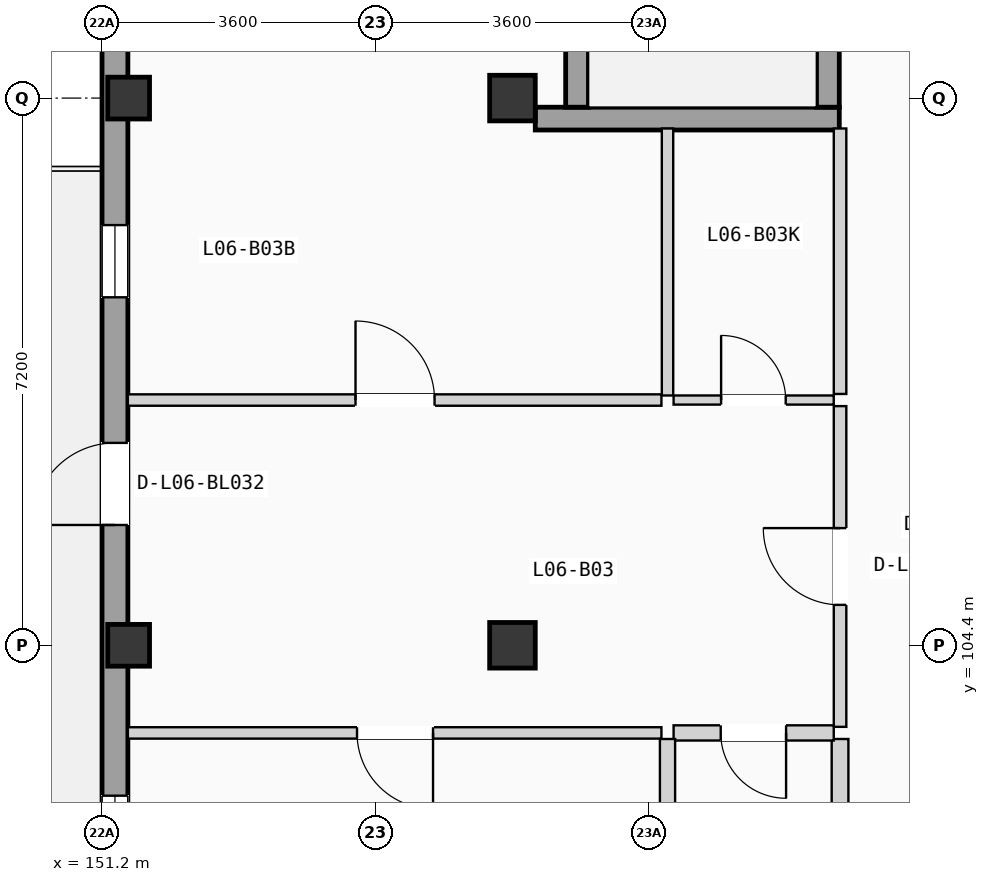
"""IFC4 building model, lengths in metres.
Left out: names, types, materials, properties, quantities, classifications, styles, units other than length and angle.
Written with IfcOpenShell. Run it as: python <this file> out.ifc"""

import sys

from ifc_helpers import new_model, si_unit, direction, frame, frame_2d, origin, origin_2d, place, context, subcontext, project, spatial, rectangle, extrude, element, fill, save


model = new_model("IFC4")
c1 = context("Model", 3, precision=1e-05, world=origin(), true_north=direction((0.0, 1.0)))
c2 = subcontext(c1, "Body", "Model", "MODEL_VIEW")
j1 = project(units=[si_unit("LENGTHUNIT", "METRE"), si_unit("PLANEANGLEUNIT", "RADIAN")], contexts=[c1])
p1 = place(None, origin())
s1 = spatial("IfcSite", under=j1, at=p1, CompositionType="ELEMENT")
p2 = place(p1, origin())
s2 = spatial("IfcBuilding", under=s1, at=p2, CompositionType="ELEMENT")
p3 = place(p2, frame((0.0, 0.0, 21.525)))
s3 = spatial("IfcBuildingStorey", under=s2, at=p3, CompositionType="ELEMENT", Elevation=21.525)
for number, where, z_axis, x_axis in (
    (1, (151.55, 104.4, 0.0), (0.0, 0.0, 1.0), (1.0, 0.0, 0.0)),
    (2, (151.55, 111.6, 0.0), (0.0, 0.0, 1.0), (1.0, 0.0, 0.0)),
):
    element("IfcColumn", number, at=place(p3, frame(where, z_axis=z_axis, x_axis=x_axis)), inside=s3, PredefinedType="COLUMN", context=c2, shape_type="SweptSolid", body=[
        extrude(rectangle(XDim=0.55, YDim=0.55, at=origin_2d()), origin(), (0.0, 0.0, 1.0), 3.15),
    ])
for number, where, z_axis, x_axis in (
    (3, (156.6, 104.4, 0.0), (0.0, 0.0, 1.0), (1.0, 0.0, 0.0)),
    (4, (156.6, 111.6, 0.0), (0.0, 0.0, 1.0), (1.0, 0.0, 0.0)),
):
    element("IfcColumn", number, at=place(p3, frame(where, z_axis=z_axis, x_axis=x_axis)), inside=s3, PredefinedType="COLUMN", context=c2, shape_type="SweptSolid", body=[
        extrude(rectangle(XDim=0.6, YDim=0.6, at=origin_2d()), origin(), (0.0, 0.0, 1.0), 3.15),
    ])
p4 = place(p3, frame((151.37, 68.74, 0.0), z_axis=(0.0, 0.0, 1.0), x_axis=(0.0, 1.0, 0.0)))
e5 = element("IfcWall", 5, at=p4, inside=s3, PredefinedType="SOLIDWALL", context=c2, shape_type="SweptSolid", body=[
    extrude(rectangle(XDim=49.72, YDim=0.34, at=frame_2d((24.86, 0.0))), origin(), (0.0, 0.0, 1.0), 2.89),
])
p5 = place(p4, frame((11.462, 0.0, 0.0)))
e6 = element("IfcOpeningElement", 6, at=p5, cuts=e5, PredefinedType="OPENING", context=c2, shape_type="SweptSolid", body=[
    extrude(rectangle(XDim=0.95, YDim=2.15, at=frame_2d((0.475, 1.075))), frame((0.0, 0.18, 0.0), z_axis=(0.0, -1.0, 0.0), x_axis=(1.0, 0.0, 0.0)), (0.0, 0.0, 1.0), 0.36),
])
p6 = place(p4, frame((8.082, 0.0, 0.555)))
e7 = element("IfcOpeningElement", 7, at=p6, cuts=e5, PredefinedType="OPENING", context=c2, shape_type="SweptSolid", body=[
    extrude(rectangle(XDim=1.85, YDim=1.65, at=frame_2d((0.925, 0.825))), frame((0.0, 0.18, 0.0), z_axis=(0.0, -1.0, 0.0), x_axis=(1.0, 0.0, 0.0)), (0.0, 0.0, 1.0), 0.36),
])
p7 = place(p4, frame((16.565, 0.0, 0.85)))
e8 = element("IfcOpeningElement", 8, at=p7, cuts=e5, PredefinedType="OPENING", context=c2, shape_type="SweptSolid", body=[
    extrude(rectangle(XDim=0.95, YDim=1.2, at=frame_2d((0.475, 0.6))), frame((0.0, 0.18, 0.0), z_axis=(0.0, -1.0, 0.0), x_axis=(1.0, 0.0, 0.0)), (0.0, 0.0, 1.0), 0.36),
])
p8 = place(p4, frame((23.86, 0.0, 0.9)))
e9 = element("IfcOpeningElement", 9, at=p8, cuts=e5, PredefinedType="OPENING", context=c2, shape_type="SweptSolid", body=[
    extrude(rectangle(XDim=2.0, YDim=1.2, at=frame_2d((1.0, 0.6))), frame((0.0, 0.18, 0.0), z_axis=(0.0, -1.0, 0.0), x_axis=(1.0, 0.0, 0.0)), (0.0, 0.0, 1.0), 0.36),
])
p9 = place(p4, frame((19.503, 0.0, 0.85)))
e10 = element("IfcOpeningElement", 10, at=p9, cuts=e5, PredefinedType="OPENING", context=c2, shape_type="SweptSolid", body=[
    extrude(rectangle(XDim=0.95, YDim=1.2, at=frame_2d((0.475, 0.6))), frame((0.0, 0.18, 0.0), z_axis=(0.0, -1.0, 0.0), x_axis=(1.0, 0.0, 0.0)), (0.0, 0.0, 1.0), 0.36),
])
p10 = place(p4, frame((29.267, 0.0, 0.85)))
e11 = element("IfcOpeningElement", 11, at=p10, cuts=e5, PredefinedType="OPENING", context=c2, shape_type="SweptSolid", body=[
    extrude(rectangle(XDim=0.95, YDim=1.2, at=frame_2d((0.475, 0.6))), frame((0.0, 0.18, 0.0), z_axis=(0.0, -1.0, 0.0), x_axis=(1.0, 0.0, 0.0)), (0.0, 0.0, 1.0), 0.36),
])
p11 = place(p4, frame((37.243, 0.0, 0.0)))
e12 = element("IfcOpeningElement", 12, at=p11, cuts=e5, PredefinedType="OPENING", context=c2, shape_type="SweptSolid", body=[
    extrude(rectangle(XDim=1.08, YDim=2.18, at=frame_2d((0.54, 1.09))), frame((0.0, 0.18, 0.0), z_axis=(0.0, -1.0, 0.0), x_axis=(1.0, 0.0, 0.0)), (0.0, 0.0, 1.0), 0.36),
])
p12 = place(p4, frame((31.681, 0.0, 0.555)))
e13 = element("IfcOpeningElement", 13, at=p12, cuts=e5, PredefinedType="OPENING", context=c2, shape_type="SweptSolid", body=[
    extrude(rectangle(XDim=2.0, YDim=1.65, at=frame_2d((1.0, 0.825))), frame((0.0, 0.18, 0.0), z_axis=(0.0, -1.0, 0.0), x_axis=(1.0, 0.0, 0.0)), (0.0, 0.0, 1.0), 0.36),
])
p13 = place(p4, frame((40.239, 0.0, 0.85)))
e14 = element("IfcOpeningElement", 14, at=p13, cuts=e5, PredefinedType="OPENING", context=c2, shape_type="SweptSolid", body=[
    extrude(rectangle(XDim=0.95, YDim=1.2, at=frame_2d((0.475, 0.6))), frame((0.0, 0.18, 0.0), z_axis=(0.0, -1.0, 0.0), x_axis=(1.0, 0.0, 0.0)), (0.0, 0.0, 1.0), 0.36),
])
p14 = place(p3, frame((156.9, 111.33, 0.0), z_axis=(0.0, 0.0, 1.0), x_axis=(1.0, 0.0, 0.0)))
e15 = element("IfcWall", 15, at=p14, inside=s3, PredefinedType="SHEAR", context=c2, shape_type="SweptSolid", body=[
    extrude(rectangle(XDim=4.0, YDim=0.3, at=frame_2d((2.0, 0.0))), origin(), (0.0, 0.0, 1.0), 2.89),
])
p15 = place(p3, frame((157.45, 111.48, 0.0), z_axis=(0.0, 0.0, 1.0), x_axis=(0.0, 1.0, 0.0)))
e16 = element("IfcWall", 16, at=p15, inside=s3, PredefinedType="SHEAR", context=c2, shape_type="SweptSolid", body=[
    extrude(rectangle(XDim=7.0, YDim=0.3, at=frame_2d((3.5, 0.0))), origin(), (0.0, 0.0, 1.0), 2.89),
])
p16 = place(p3, frame((160.75, 111.48, 0.0), z_axis=(0.0, 0.0, 1.0), x_axis=(0.0, 1.0, 0.0)))
e17 = element("IfcWall", 17, at=p16, inside=s3, PredefinedType="SHEAR", context=c2, shape_type="SweptSolid", body=[
    extrude(rectangle(XDim=7.0, YDim=0.3, at=frame_2d((3.5, 0.0))), origin(), (0.0, 0.0, 1.0), 2.89),
])
p17 = place(p16, frame((5.625, 0.0, 0.0)))
e18 = element("IfcOpeningElement", 18, at=p17, cuts=e17, PredefinedType="OPENING", context=c2, shape_type="SweptSolid", body=[
    extrude(rectangle(XDim=1.15, YDim=2.12, at=frame_2d((0.575, 1.06))), frame((0.0, 0.16, 0.0), z_axis=(0.0, -1.0, 0.0), x_axis=(1.0, 0.0, 0.0)), (0.0, 0.0, 1.0), 0.32),
])
p18 = place(p3, frame((160.91, 103.327, 0.0), z_axis=(0.0, 0.0, 1.0), x_axis=(0.0, 1.0, 0.0)))
e19 = element("IfcWall", 19, at=p18, inside=s3, PredefinedType="PARTITIONING", context=c2, shape_type="SweptSolid", body=[
    extrude(rectangle(XDim=4.22, YDim=0.165, at=frame_2d((2.11, 0.0))), origin(), (0.0, 0.0, 1.0), 2.87),
])
p19 = place(p18, frame((1.605, 0.0, 0.0)))
e20 = element("IfcOpeningElement", 20, at=p19, cuts=e19, PredefinedType="OPENING", context=c2, shape_type="SweptSolid", body=[
    extrude(rectangle(XDim=1.01, YDim=2.11, at=frame_2d((0.505, 1.055))), frame((0.0, 0.093, 0.0), z_axis=(0.0, -1.0, 0.0), x_axis=(1.0, 0.0, 0.0)), (0.0, 0.0, 1.0), 0.185),
])
p20 = place(p3, frame((160.91, 99.674, 0.0), z_axis=(0.0, 0.0, 1.0), x_axis=(0.0, 1.0, 0.0)))
e21 = element("IfcWall", 21, at=p20, inside=s3, PredefinedType="PLUMBINGWALL", context=c2, shape_type="SweptSolid", body=[
    extrude(rectangle(XDim=3.493, YDim=0.22, at=frame_2d((1.747, 0.0))), origin(), (0.0, 0.0, 1.0), 2.87),
])
p21 = place(p3, frame((160.91, 107.707, 0.0), z_axis=(0.0, 0.0, 1.0), x_axis=(0.0, 1.0, 0.0)))
e22 = element("IfcWall", 22, at=p21, inside=s3, PredefinedType="PARTITIONING", context=c2, shape_type="SweptSolid", body=[
    extrude(rectangle(XDim=3.493, YDim=0.165, at=frame_2d((1.747, 0.0))), origin(), (0.0, 0.0, 1.0), 2.87),
])
p22 = place(p3, frame((158.72, 103.247, 0.0), z_axis=(0.0, 0.0, 1.0), x_axis=(1.0, 0.0, 0.0)))
e23 = element("IfcWall", 23, at=p22, inside=s3, PredefinedType="PLUMBINGWALL", context=c2, shape_type="SweptSolid", body=[
    extrude(rectangle(XDim=2.107, YDim=0.2, at=frame_2d((1.053, 0.0))), origin(), (0.0, 0.0, 1.0), 2.87),
])
p23 = place(p22, frame((0.62, 0.0, 0.0)))
e24 = element("IfcOpeningElement", 24, at=p23, cuts=e23, PredefinedType="OPENING", context=c2, shape_type="SweptSolid", body=[
    extrude(rectangle(XDim=0.86, YDim=2.0, at=frame_2d((0.43, 1.0))), frame((0.0, 0.11, 0.0), z_axis=(0.0, -1.0, 0.0), x_axis=(1.0, 0.0, 0.0)), (0.0, 0.0, 1.0), 0.22),
])
p24 = place(p3, frame((158.72, 107.627, 0.0), z_axis=(0.0, 0.0, 1.0), x_axis=(1.0, 0.0, 0.0)))
e25 = element("IfcWall", 25, at=p24, inside=s3, PredefinedType="PARTITIONING", context=c2, shape_type="SweptSolid", body=[
    extrude(rectangle(XDim=2.107, YDim=0.12, at=frame_2d((1.053, 0.0))), origin(), (0.0, 0.0, 1.0), 2.87),
])
p25 = place(p24, frame((0.625, 0.0, 0.0)))
e26 = element("IfcOpeningElement", 26, at=p25, cuts=e25, PredefinedType="OPENING", context=c2, shape_type="SweptSolid", body=[
    extrude(rectangle(XDim=0.85, YDim=2.01, at=frame_2d((0.425, 1.005))), frame((0.0, 0.07, 0.0), z_axis=(0.0, -1.0, 0.0), x_axis=(1.0, 0.0, 0.0)), (0.0, 0.0, 1.0), 0.14),
])
p26 = place(p3, frame((151.54, 103.247, 0.0), z_axis=(0.0, 0.0, 1.0), x_axis=(1.0, 0.0, 0.0)))
e27 = element("IfcWall", 27, at=p26, inside=s3, PredefinedType="PARTITIONING", context=c2, shape_type="SweptSolid", body=[
    extrude(rectangle(XDim=7.02, YDim=0.15, at=frame_2d((3.51, 0.0))), origin(), (0.0, 0.0, 1.0), 2.87),
])
p27 = place(p26, frame((3.015, 0.0, 0.0)))
e28 = element("IfcOpeningElement", 28, at=p27, cuts=e27, PredefinedType="OPENING", context=c2, shape_type="SweptSolid", body=[
    extrude(rectangle(XDim=1.0, YDim=2.06, at=frame_2d((0.5, 1.03))), frame((0.0, 0.085, 0.0), z_axis=(0.0, -1.0, 0.0), x_axis=(1.0, 0.0, 0.0)), (0.0, 0.0, 1.0), 0.17),
])
p28 = place(p3, frame((151.54, 107.627, 0.0), z_axis=(0.0, 0.0, 1.0), x_axis=(1.0, 0.0, 0.0)))
e29 = element("IfcWall", 29, at=p28, inside=s3, PredefinedType="PARTITIONING", context=c2, shape_type="SweptSolid", body=[
    extrude(rectangle(XDim=7.02, YDim=0.15, at=frame_2d((3.51, 0.0))), origin(), (0.0, 0.0, 1.0), 2.87),
])
p29 = place(p28, frame((2.995, 0.0, 0.0)))
e30 = element("IfcOpeningElement", 30, at=p29, cuts=e29, PredefinedType="OPENING", context=c2, shape_type="SweptSolid", body=[
    extrude(rectangle(XDim=1.04, YDim=2.08, at=frame_2d((0.52, 1.04))), frame((0.0, 0.085, 0.0), z_axis=(0.0, -1.0, 0.0), x_axis=(1.0, 0.0, 0.0)), (0.0, 0.0, 1.0), 0.17),
])
p30 = place(p3, frame((158.64, 99.674, 0.0), z_axis=(0.0, 0.0, 1.0), x_axis=(0.0, 1.0, 0.0)))
e31 = element("IfcWall", 31, at=p30, inside=s3, PredefinedType="PLUMBINGWALL", context=c2, shape_type="SweptSolid", body=[
    extrude(rectangle(XDim=3.493, YDim=0.2, at=frame_2d((1.747, 0.0))), origin(), (0.0, 0.0, 1.0), 2.87),
])
p31 = place(p3, frame((158.64, 107.687, 0.0), z_axis=(0.0, 0.0, 1.0), x_axis=(0.0, 1.0, 0.0)))
e32 = element("IfcWall", 32, at=p31, inside=s3, PredefinedType="PARTITIONING", context=c2, shape_type="SweptSolid", body=[
    extrude(rectangle(XDim=3.513, YDim=0.15, at=frame_2d((1.756, 0.0))), origin(), (0.0, 0.0, 1.0), 2.87),
])
p32 = place(p11, origin())
e33 = element("IfcDoor", 33, at=p32, inside=s3, OperationType="SINGLE_SWING_LEFT", PredefinedType="DOOR", context=c2, shape_type="SweptSolid", body=[
    extrude(rectangle(XDim=1.08, YDim=2.18, at=frame_2d((0.54, 1.09))), frame((0.0, 0.025, 0.0), z_axis=(0.0, -1.0, 0.0), x_axis=(1.0, 0.0, 0.0)), (0.0, 0.0, 1.0), 0.05),
])
fill(e12, e33)
p33 = place(p12, origin())
e34 = element("IfcWindow", 34, at=p33, inside=s3, PartitioningType="DOUBLE_PANEL_VERTICAL", PredefinedType="WINDOW", context=c2, shape_type="SweptSolid", body=[
    extrude(rectangle(XDim=2.0, YDim=1.65, at=frame_2d((1.0, 0.825))), frame((0.0, 0.03, 0.0), z_axis=(0.0, -1.0, 0.0), x_axis=(1.0, 0.0, 0.0)), (0.0, 0.0, 1.0), 0.06),
])
fill(e13, e34)
p34 = place(p13, origin())
e35 = element("IfcWindow", 35, at=p34, inside=s3, PartitioningType="SINGLE_PANEL", PredefinedType="WINDOW", context=c2, shape_type="SweptSolid", body=[
    extrude(rectangle(XDim=0.95, YDim=1.2, at=frame_2d((0.475, 0.6))), frame((0.0, 0.03, 0.0), z_axis=(0.0, -1.0, 0.0), x_axis=(1.0, 0.0, 0.0)), (0.0, 0.0, 1.0), 0.06),
])
fill(e14, e35)
p35 = place(p19, origin())
e36 = element("IfcDoor", 36, at=p35, inside=s3, OperationType="SINGLE_SWING_RIGHT", PredefinedType="DOOR", context=c2, shape_type="SweptSolid", body=[
    extrude(rectangle(XDim=1.01, YDim=2.11, at=frame_2d((0.505, 1.055))), frame((0.0, 0.025, 0.0), z_axis=(0.0, -1.0, 0.0), x_axis=(1.0, 0.0, 0.0)), (0.0, 0.0, 1.0), 0.05),
])
fill(e20, e36)
p36 = place(p23, frame((0.86, 0.0, 0.0), z_axis=(0.0, 0.0, 1.0), x_axis=(-1.0, 0.0, 0.0)))
e37 = element("IfcDoor", 37, at=p36, inside=s3, OperationType="SINGLE_SWING_RIGHT", PredefinedType="DOOR", context=c2, shape_type="SweptSolid", body=[
    extrude(rectangle(XDim=0.86, YDim=2.0, at=frame_2d((0.43, 1.0))), frame((0.0, 0.025, 0.0), z_axis=(0.0, -1.0, 0.0), x_axis=(1.0, 0.0, 0.0)), (0.0, 0.0, 1.0), 0.05),
])
fill(e24, e37)
p37 = place(p25, origin())
e38 = element("IfcDoor", 38, at=p37, inside=s3, OperationType="SINGLE_SWING_LEFT", PredefinedType="DOOR", context=c2, shape_type="SweptSolid", body=[
    extrude(rectangle(XDim=0.85, YDim=2.01, at=frame_2d((0.425, 1.005))), frame((0.0, 0.025, 0.0), z_axis=(0.0, -1.0, 0.0), x_axis=(1.0, 0.0, 0.0)), (0.0, 0.0, 1.0), 0.05),
])
fill(e26, e38)
p38 = place(p27, frame((1.0, 0.0, 0.0), z_axis=(0.0, 0.0, 1.0), x_axis=(-1.0, 0.0, 0.0)))
e39 = element("IfcDoor", 39, at=p38, inside=s3, OperationType="SINGLE_SWING_RIGHT", PredefinedType="DOOR", context=c2, shape_type="SweptSolid", body=[
    extrude(rectangle(XDim=1.0, YDim=2.06, at=frame_2d((0.5, 1.03))), frame((0.0, 0.025, 0.0), z_axis=(0.0, -1.0, 0.0), x_axis=(1.0, 0.0, 0.0)), (0.0, 0.0, 1.0), 0.05),
])
fill(e28, e39)
p39 = place(p29, origin())
e40 = element("IfcDoor", 40, at=p39, inside=s3, OperationType="SINGLE_SWING_LEFT", PredefinedType="DOOR", context=c2, shape_type="SweptSolid", body=[
    extrude(rectangle(XDim=1.04, YDim=2.08, at=frame_2d((0.52, 1.04))), frame((0.0, 0.025, 0.0), z_axis=(0.0, -1.0, 0.0), x_axis=(1.0, 0.0, 0.0)), (0.0, 0.0, 1.0), 0.05),
])
fill(e30, e40)
save(model, sys.argv[1])
